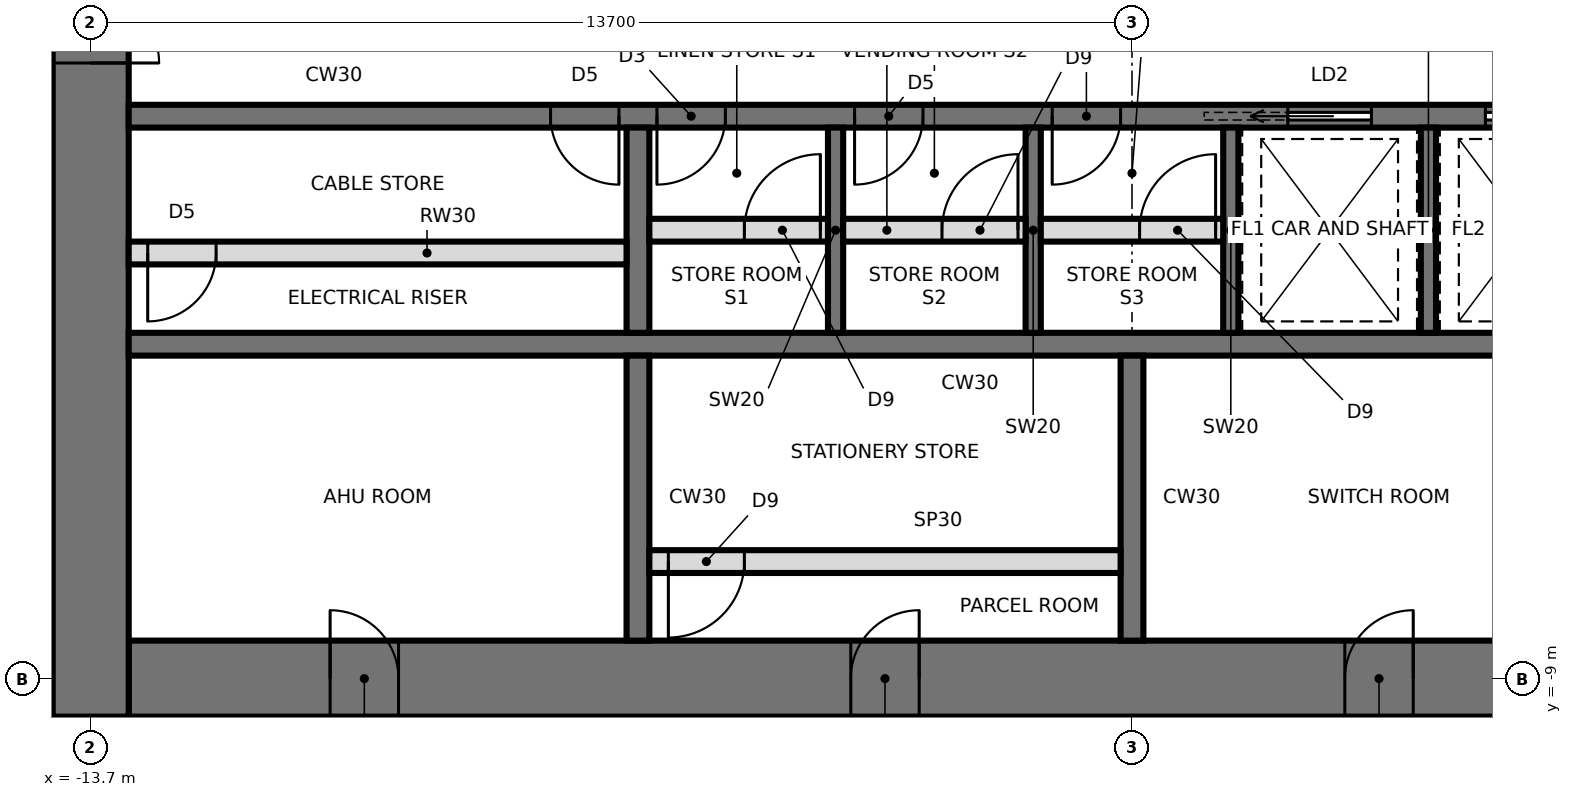
"""IFC4 building model, lengths in metres.
Left out: names, types, materials, properties, quantities, classifications, styles, units other than length and angle.
Written with IfcOpenShell. Run it as: python <this file> out.ifc"""

import sys

from ifc_helpers import new_model, si_unit, direction, frame, frame_2d, origin, place, context, subcontext, project, spatial, rectangle, extrude, element, fill, save


model = new_model("IFC4")
c1 = context("Model", 3, precision=1e-05, world=origin(), true_north=direction((0.0, 1.0)))
c2 = subcontext(c1, "Body", "Model", "MODEL_VIEW")
j1 = project(units=[si_unit("LENGTHUNIT", "METRE"), si_unit("PLANEANGLEUNIT", "RADIAN")], contexts=[c1])
p1 = place(None, origin())
s1 = spatial("IfcSite", under=j1, at=p1, CompositionType="ELEMENT")
p2 = place(p1, origin())
s2 = spatial("IfcBuilding", under=s1, at=p2, CompositionType="ELEMENT")
p3 = place(p2, frame((0.0, 0.0, 264.4)))
s3 = spatial("IfcBuildingStorey", under=s2, at=p3, CompositionType="ELEMENT", Elevation=264.4)
p4 = place(p3, frame((-13.2, -9.0, 0.0), z_axis=(0.0, 0.0, 1.0), x_axis=(1.0, 0.0, 0.0)))
e1 = element("IfcWall", 1, at=p4, inside=s3, PredefinedType="SHEAR", context=c2, shape_type="SweptSolid", body=[
    extrude(rectangle(XDim=26.4, YDim=1.0, at=frame_2d((13.2, 0.0))), origin(), (0.0, 0.0, 1.0), 4.2),
])
p5 = place(p4, frame((2.65, 0.0, 0.0)))
e2 = element("IfcOpeningElement", 2, at=p5, cuts=e1, PredefinedType="OPENING", context=c2, shape_type="SweptSolid", body=[
    extrude(rectangle(XDim=0.9, YDim=2.1, at=frame_2d((0.45, 1.05))), frame((0.0, 0.51, 0.0), z_axis=(0.0, -1.0, 0.0), x_axis=(1.0, 0.0, 0.0)), (0.0, 0.0, 1.0), 1.02),
])
p6 = place(p4, frame((9.5, 0.0, 0.0)))
e3 = element("IfcOpeningElement", 3, at=p6, cuts=e1, PredefinedType="OPENING", context=c2, shape_type="SweptSolid", body=[
    extrude(rectangle(XDim=0.9, YDim=2.1, at=frame_2d((0.45, 1.05))), frame((0.0, 0.51, 0.0), z_axis=(0.0, -1.0, 0.0), x_axis=(1.0, 0.0, 0.0)), (0.0, 0.0, 1.0), 1.02),
])
p7 = place(p4, frame((16.0, 0.0, 0.0)))
e4 = element("IfcOpeningElement", 4, at=p7, cuts=e1, PredefinedType="OPENING", context=c2, shape_type="SweptSolid", body=[
    extrude(rectangle(XDim=0.9, YDim=2.1, at=frame_2d((0.45, 1.05))), frame((0.0, 0.51, 0.0), z_axis=(0.0, -1.0, 0.0), x_axis=(1.0, 0.0, 0.0)), (0.0, 0.0, 1.0), 1.02),
])
p8 = place(p4, frame((22.85, 0.0, 0.0)))
e5 = element("IfcOpeningElement", 5, at=p8, cuts=e1, PredefinedType="OPENING", context=c2, shape_type="SweptSolid", body=[
    extrude(rectangle(XDim=0.9, YDim=2.1, at=frame_2d((0.45, 1.05))), frame((0.0, 0.51, 0.0), z_axis=(0.0, -1.0, 0.0), x_axis=(1.0, 0.0, 0.0)), (0.0, 0.0, 1.0), 1.02),
])
p9 = place(p3, frame((-13.7, 9.5, 0.0), z_axis=(0.0, 0.0, 1.0), x_axis=(0.0, -1.0, 0.0)))
e6 = element("IfcWall", 6, at=p9, inside=s3, PredefinedType="SHEAR", context=c2, shape_type="SweptSolid", body=[
    extrude(rectangle(XDim=19.0, YDim=1.0, at=frame_2d((9.5, 0.0))), origin(), (0.0, 0.0, 1.0), 4.2),
])
p10 = place(p9, frame((8.6, 0.0, 0.0)))
e7 = element("IfcOpeningElement", 7, at=p10, cuts=e6, PredefinedType="OPENING", context=c2, shape_type="SweptSolid", body=[
    extrude(rectangle(XDim=1.8, YDim=2.4, at=frame_2d((0.9, 1.2))), frame((0.0, 0.51, 0.0), z_axis=(0.0, -1.0, 0.0), x_axis=(1.0, 0.0, 0.0)), (0.0, 0.0, 1.0), 1.02),
])
p11 = place(p3, frame((-13.2, -1.6, 0.0), z_axis=(0.0, 0.0, 1.0), x_axis=(1.0, 0.0, 0.0)))
e8 = element("IfcWall", 8, at=p11, inside=s3, PredefinedType="SHEAR", context=c2, shape_type="SweptSolid", body=[
    extrude(rectangle(XDim=26.4, YDim=0.3, at=frame_2d((13.2, 0.0))), origin(), (0.0, 0.0, 1.0), 4.2),
])
p12 = place(p11, frame((25.15, 0.0, 0.0)))
e9 = element("IfcOpeningElement", 9, at=p12, cuts=e8, PredefinedType="OPENING", context=c2, shape_type="SweptSolid", body=[
    extrude(rectangle(XDim=1.0, YDim=2.1, at=frame_2d((0.5, 1.05))), frame((0.0, 0.16, 0.0), z_axis=(0.0, -1.0, 0.0), x_axis=(1.0, 0.0, 0.0)), (0.0, 0.0, 1.0), 0.32),
])
p13 = place(p11, frame((6.95, 0.0, 0.0)))
e10 = element("IfcOpeningElement", 10, at=p13, cuts=e8, PredefinedType="OPENING", context=c2, shape_type="SweptSolid", body=[
    extrude(rectangle(XDim=0.9, YDim=2.1, at=frame_2d((0.45, 1.05))), frame((0.0, 0.16, 0.0), z_axis=(0.0, -1.0, 0.0), x_axis=(1.0, 0.0, 0.0)), (0.0, 0.0, 1.0), 0.32),
])
p14 = place(p11, frame((9.55, 0.0, 0.0)))
e11 = element("IfcOpeningElement", 11, at=p14, cuts=e8, PredefinedType="OPENING", context=c2, shape_type="SweptSolid", body=[
    extrude(rectangle(XDim=0.9, YDim=2.1, at=frame_2d((0.45, 1.05))), frame((0.0, 0.16, 0.0), z_axis=(0.0, -1.0, 0.0), x_axis=(1.0, 0.0, 0.0)), (0.0, 0.0, 1.0), 0.32),
])
p15 = place(p11, frame((12.15, 0.0, 0.0)))
e12 = element("IfcOpeningElement", 12, at=p15, cuts=e8, PredefinedType="OPENING", context=c2, shape_type="SweptSolid", body=[
    extrude(rectangle(XDim=0.9, YDim=2.1, at=frame_2d((0.45, 1.05))), frame((0.0, 0.16, 0.0), z_axis=(0.0, -1.0, 0.0), x_axis=(1.0, 0.0, 0.0)), (0.0, 0.0, 1.0), 0.32),
])
p16 = place(p11, frame((15.25, 0.0, 0.0)))
e13 = element("IfcOpeningElement", 13, at=p16, cuts=e8, PredefinedType="OPENING", context=c2, shape_type="SweptSolid", body=[
    extrude(rectangle(XDim=1.1, YDim=2.3, at=frame_2d((0.55, 1.15))), frame((0.0, 0.16, 0.0), z_axis=(0.0, -1.0, 0.0), x_axis=(1.0, 0.0, 0.0)), (0.0, 0.0, 1.0), 0.32),
])
p17 = place(p11, frame((17.85, 0.0, 0.0)))
e14 = element("IfcOpeningElement", 14, at=p17, cuts=e8, PredefinedType="OPENING", context=c2, shape_type="SweptSolid", body=[
    extrude(rectangle(XDim=1.1, YDim=2.3, at=frame_2d((0.55, 1.15))), frame((0.0, 0.16, 0.0), z_axis=(0.0, -1.0, 0.0), x_axis=(1.0, 0.0, 0.0)), (0.0, 0.0, 1.0), 0.32),
])
p18 = place(p11, frame((5.55, 0.0, 0.0)))
e15 = element("IfcOpeningElement", 15, at=p18, cuts=e8, PredefinedType="OPENING", context=c2, shape_type="SweptSolid", body=[
    extrude(rectangle(XDim=0.9, YDim=2.1, at=frame_2d((0.45, 1.05))), frame((0.0, 0.16, 0.0), z_axis=(0.0, -1.0, 0.0), x_axis=(1.0, 0.0, 0.0)), (0.0, 0.0, 1.0), 0.32),
])
p19 = place(p3, frame((-13.2, -4.6, 0.0), z_axis=(0.0, 0.0, 1.0), x_axis=(1.0, 0.0, 0.0)))
e16 = element("IfcWall", 16, at=p19, inside=s3, PredefinedType="SHEAR", context=c2, shape_type="SweptSolid", body=[
    extrude(rectangle(XDim=26.4, YDim=0.3, at=frame_2d((13.2, 0.0))), origin(), (0.0, 0.0, 1.0), 4.2),
])
p20 = place(p3, frame((-6.5, -1.75, 0.0), z_axis=(0.0, 0.0, 1.0), x_axis=(0.0, -1.0, 0.0)))
e17 = element("IfcWall", 17, at=p20, inside=s3, PredefinedType="SHEAR", context=c2, shape_type="SweptSolid", body=[
    extrude(rectangle(XDim=2.7, YDim=0.3, at=frame_2d((1.35, 0.0))), origin(), (0.0, 0.0, 1.0), 4.2),
])
p21 = place(p3, frame((-6.5, -4.75, 0.0), z_axis=(0.0, 0.0, 1.0), x_axis=(0.0, -1.0, 0.0)))
e18 = element("IfcWall", 18, at=p21, inside=s3, PredefinedType="SHEAR", context=c2, shape_type="SweptSolid", body=[
    extrude(rectangle(XDim=3.75, YDim=0.3, at=frame_2d((1.875, 0.0))), origin(), (0.0, 0.0, 1.0), 4.2),
])
for number, where, z_axis, x_axis in (
    (19, (-3.9, -1.75, 0.0), (0.0, 0.0, 1.0), (0.0, -1.0, 0.0)),
    (20, (-1.3, -1.75, 0.0), (0.0, 0.0, 1.0), (0.0, -1.0, 0.0)),
    (21, (1.3, -1.75, 0.0), (0.0, 0.0, 1.0), (0.0, -1.0, 0.0)),
    (22, (3.9, -1.75, 0.0), (0.0, 0.0, 1.0), (0.0, -1.0, 0.0)),
):
    element("IfcWall", number, at=place(p3, frame(where, z_axis=z_axis, x_axis=x_axis)), inside=s3, PredefinedType="SHEAR", context=c2, shape_type="SweptSolid", body=[
        extrude(rectangle(XDim=2.7, YDim=0.2, at=frame_2d((1.35, 0.0))), origin(), (0.0, 0.0, 1.0), 4.2),
    ])
p22 = place(p3, frame((0.0, -4.75, 0.0), z_axis=(0.0, 0.0, 1.0), x_axis=(0.0, -1.0, 0.0)))
e23 = element("IfcWall", 23, at=p22, inside=s3, PredefinedType="SHEAR", context=c2, shape_type="SweptSolid", body=[
    extrude(rectangle(XDim=3.75, YDim=0.3, at=frame_2d((1.875, 0.0))), origin(), (0.0, 0.0, 1.0), 4.2),
])
p23 = place(p3, frame((-6.35, -3.1, 0.0), z_axis=(0.0, 0.0, 1.0), x_axis=(1.0, 0.0, 0.0)))
e24 = element("IfcWall", 24, at=p23, inside=s3, PredefinedType="PARTITIONING", context=c2, shape_type="SweptSolid", body=[
    extrude(rectangle(XDim=2.35, YDim=0.3, at=frame_2d((1.175, 0.0))), origin(), (0.0, 0.0, 1.0), 4.04),
])
p24 = place(p23, frame((1.25, 0.0, 0.0)))
e25 = element("IfcOpeningElement", 25, at=p24, cuts=e24, PredefinedType="OPENING", context=c2, shape_type="SweptSolid", body=[
    extrude(rectangle(XDim=1.0, YDim=2.4, at=frame_2d((0.5, 1.2))), frame((0.0, 0.16, 0.0), z_axis=(0.0, -1.0, 0.0), x_axis=(1.0, 0.0, 0.0)), (0.0, 0.0, 1.0), 0.32),
])
p25 = place(p3, frame((-3.8, -3.1, 0.0), z_axis=(0.0, 0.0, 1.0), x_axis=(1.0, 0.0, 0.0)))
e26 = element("IfcWall", 26, at=p25, inside=s3, PredefinedType="PARTITIONING", context=c2, shape_type="SweptSolid", body=[
    extrude(rectangle(XDim=2.4, YDim=0.3, at=frame_2d((1.2, 0.0))), origin(), (0.0, 0.0, 1.0), 4.04),
])
p26 = place(p25, frame((1.3, 0.0, 0.0)))
e27 = element("IfcOpeningElement", 27, at=p26, cuts=e26, PredefinedType="OPENING", context=c2, shape_type="SweptSolid", body=[
    extrude(rectangle(XDim=1.0, YDim=2.4, at=frame_2d((0.5, 1.2))), frame((0.0, 0.16, 0.0), z_axis=(0.0, -1.0, 0.0), x_axis=(1.0, 0.0, 0.0)), (0.0, 0.0, 1.0), 0.32),
])
p27 = place(p3, frame((-1.2, -3.1, 0.0), z_axis=(0.0, 0.0, 1.0), x_axis=(1.0, 0.0, 0.0)))
e28 = element("IfcWall", 28, at=p27, inside=s3, PredefinedType="PARTITIONING", context=c2, shape_type="SweptSolid", body=[
    extrude(rectangle(XDim=2.4, YDim=0.3, at=frame_2d((1.2, 0.0))), origin(), (0.0, 0.0, 1.0), 4.04),
])
p28 = place(p27, frame((1.3, 0.0, 0.0)))
e29 = element("IfcOpeningElement", 29, at=p28, cuts=e28, PredefinedType="OPENING", context=c2, shape_type="SweptSolid", body=[
    extrude(rectangle(XDim=1.0, YDim=2.4, at=frame_2d((0.5, 1.2))), frame((0.0, 0.16, 0.0), z_axis=(0.0, -1.0, 0.0), x_axis=(1.0, 0.0, 0.0)), (0.0, 0.0, 1.0), 0.32),
])
p29 = place(p3, frame((-6.35, -7.46, 0.0), z_axis=(0.0, 0.0, 1.0), x_axis=(1.0, 0.0, 0.0)))
e30 = element("IfcWall", 30, at=p29, inside=s3, PredefinedType="PARTITIONING", context=c2, shape_type="SweptSolid", body=[
    extrude(rectangle(XDim=6.2, YDim=0.3, at=frame_2d((3.1, 0.0))), origin(), (0.0, 0.0, 1.0), 4.04),
])
p30 = place(p29, frame((0.25, 0.0, 0.0)))
e31 = element("IfcOpeningElement", 31, at=p30, cuts=e30, PredefinedType="OPENING", context=c2, shape_type="SweptSolid", body=[
    extrude(rectangle(XDim=1.0, YDim=2.4, at=frame_2d((0.5, 1.2))), frame((0.0, 0.16, 0.0), z_axis=(0.0, -1.0, 0.0), x_axis=(1.0, 0.0, 0.0)), (0.0, 0.0, 1.0), 0.32),
])
p31 = place(p3, frame((-13.2, -3.4, 0.0), z_axis=(0.0, 0.0, 1.0), x_axis=(1.0, 0.0, 0.0)))
e32 = element("IfcWall", 32, at=p31, inside=s3, PredefinedType="SOLIDWALL", context=c2, shape_type="SweptSolid", body=[
    extrude(rectangle(XDim=6.55, YDim=0.3, at=frame_2d((3.275, 0.0))), origin(), (0.0, 0.0, 1.0), 4.04),
])
p32 = place(p31, frame((0.25, 0.0, 0.0)))
e33 = element("IfcOpeningElement", 33, at=p32, cuts=e32, PredefinedType="OPENING", context=c2, shape_type="SweptSolid", body=[
    extrude(rectangle(XDim=0.9, YDim=2.1, at=frame_2d((0.45, 1.05))), frame((0.0, 0.16, 0.0), z_axis=(0.0, -1.0, 0.0), x_axis=(1.0, 0.0, 0.0)), (0.0, 0.0, 1.0), 0.32),
])
p33 = place(p10, origin())
e34 = element("IfcDoor", 34, at=p33, inside=s3, OperationType="DOUBLE_DOOR_SINGLE_SWING", PredefinedType="DOOR", context=c2, shape_type="SweptSolid", body=[
    extrude(rectangle(XDim=1.72, YDim=2.36, at=frame_2d((0.9, 1.18))), frame((0.0, 0.025, 0.0), z_axis=(0.0, -1.0, 0.0), x_axis=(1.0, 0.0, 0.0)), (0.0, 0.0, 1.0), 0.05),
    extrude(rectangle(XDim=0.04, YDim=2.4, at=frame_2d((0.02, 1.2))), frame((0.0, 0.25, 0.0), z_axis=(0.0, -1.0, 0.0), x_axis=(1.0, 0.0, 0.0)), (0.0, 0.0, 1.0), 0.5),
    extrude(rectangle(XDim=0.04, YDim=2.4, at=frame_2d((1.78, 1.2))), frame((0.0, 0.25, 0.0), z_axis=(0.0, -1.0, 0.0), x_axis=(1.0, 0.0, 0.0)), (0.0, 0.0, 1.0), 0.5),
    extrude(rectangle(XDim=1.72, YDim=0.04, at=frame_2d((0.9, 2.38))), frame((0.0, 0.25, 0.0), z_axis=(0.0, -1.0, 0.0), x_axis=(1.0, 0.0, 0.0)), (0.0, 0.0, 1.0), 0.5),
])
fill(e7, e34)
p34 = place(p24, origin())
e35 = element("IfcDoor", 35, at=p34, inside=s3, OperationType="SINGLE_SWING_RIGHT", PredefinedType="DOOR", context=c2, shape_type="SweptSolid", body=[
    extrude(rectangle(XDim=1.0, YDim=2.4, at=frame_2d((0.5, 1.2))), frame((0.0, 0.025, 0.0), z_axis=(0.0, -1.0, 0.0), x_axis=(1.0, 0.0, 0.0)), (0.0, 0.0, 1.0), 0.05),
])
fill(e25, e35)
p35 = place(p13, frame((0.9, 0.0, 0.0), z_axis=(0.0, 0.0, 1.0), x_axis=(-1.0, 0.0, 0.0)))
e36 = element("IfcDoor", 36, at=p35, inside=s3, OperationType="SINGLE_SWING_RIGHT", PredefinedType="DOOR", context=c2, shape_type="SweptSolid", body=[
    extrude(rectangle(XDim=0.9, YDim=2.1, at=frame_2d((0.45, 1.05))), frame((0.0, 0.025, 0.0), z_axis=(0.0, -1.0, 0.0), x_axis=(1.0, 0.0, 0.0)), (0.0, 0.0, 1.0), 0.05),
])
fill(e10, e36)
p36 = place(p26, origin())
e37 = element("IfcDoor", 37, at=p36, inside=s3, OperationType="SINGLE_SWING_RIGHT", PredefinedType="DOOR", context=c2, shape_type="SweptSolid", body=[
    extrude(rectangle(XDim=1.0, YDim=2.4, at=frame_2d((0.5, 1.2))), frame((0.0, 0.025, 0.0), z_axis=(0.0, -1.0, 0.0), x_axis=(1.0, 0.0, 0.0)), (0.0, 0.0, 1.0), 0.05),
])
fill(e27, e37)
p37 = place(p14, frame((0.9, 0.0, 0.0), z_axis=(0.0, 0.0, 1.0), x_axis=(-1.0, 0.0, 0.0)))
e38 = element("IfcDoor", 38, at=p37, inside=s3, OperationType="SINGLE_SWING_RIGHT", PredefinedType="DOOR", context=c2, shape_type="SweptSolid", body=[
    extrude(rectangle(XDim=0.9, YDim=2.1, at=frame_2d((0.45, 1.05))), frame((0.0, 0.025, 0.0), z_axis=(0.0, -1.0, 0.0), x_axis=(1.0, 0.0, 0.0)), (0.0, 0.0, 1.0), 0.05),
])
fill(e11, e38)
p38 = place(p28, origin())
e39 = element("IfcDoor", 39, at=p38, inside=s3, OperationType="SINGLE_SWING_RIGHT", PredefinedType="DOOR", context=c2, shape_type="SweptSolid", body=[
    extrude(rectangle(XDim=1.0, YDim=2.4, at=frame_2d((0.5, 1.2))), frame((0.0, 0.025, 0.0), z_axis=(0.0, -1.0, 0.0), x_axis=(1.0, 0.0, 0.0)), (0.0, 0.0, 1.0), 0.05),
])
fill(e29, e39)
p39 = place(p15, frame((0.9, 0.0, 0.0), z_axis=(0.0, 0.0, 1.0), x_axis=(-1.0, 0.0, 0.0)))
e40 = element("IfcDoor", 40, at=p39, inside=s3, OperationType="SINGLE_SWING_RIGHT", PredefinedType="DOOR", context=c2, shape_type="SweptSolid", body=[
    extrude(rectangle(XDim=0.9, YDim=2.1, at=frame_2d((0.45, 1.05))), frame((0.0, 0.025, 0.0), z_axis=(0.0, -1.0, 0.0), x_axis=(1.0, 0.0, 0.0)), (0.0, 0.0, 1.0), 0.05),
])
fill(e12, e40)
p40 = place(p16, frame((1.1, 0.0, 0.0), z_axis=(0.0, 0.0, 1.0), x_axis=(-1.0, 0.0, 0.0)))
e41 = element("IfcDoor", 41, at=p40, inside=s3, OperationType="SLIDING_TO_RIGHT", PredefinedType="DOOR", context=c2, shape_type="SweptSolid", body=[
    extrude(rectangle(XDim=1.1, YDim=2.3, at=frame_2d((0.55, 1.15))), frame((0.0, 0.025, 0.0), z_axis=(0.0, -1.0, 0.0), x_axis=(1.0, 0.0, 0.0)), (0.0, 0.0, 1.0), 0.05),
])
fill(e13, e41)
p41 = place(p17, frame((1.1, 0.0, 0.0), z_axis=(0.0, 0.0, 1.0), x_axis=(-1.0, 0.0, 0.0)))
e42 = element("IfcDoor", 42, at=p41, inside=s3, OperationType="SLIDING_TO_LEFT", PredefinedType="DOOR", context=c2, shape_type="SweptSolid", body=[
    extrude(rectangle(XDim=1.1, YDim=2.3, at=frame_2d((0.55, 1.15))), frame((0.0, 0.025, 0.0), z_axis=(0.0, -1.0, 0.0), x_axis=(1.0, 0.0, 0.0)), (0.0, 0.0, 1.0), 0.05),
])
fill(e14, e42)
p42 = place(p18, frame((0.9, 0.0, 0.0), z_axis=(0.0, 0.0, 1.0), x_axis=(-1.0, 0.0, 0.0)))
e43 = element("IfcDoor", 43, at=p42, inside=s3, OperationType="SINGLE_SWING_LEFT", PredefinedType="DOOR", context=c2, shape_type="SweptSolid", body=[
    extrude(rectangle(XDim=0.9, YDim=2.1, at=frame_2d((0.45, 1.05))), frame((0.0, 0.025, 0.0), z_axis=(0.0, -1.0, 0.0), x_axis=(1.0, 0.0, 0.0)), (0.0, 0.0, 1.0), 0.05),
])
fill(e15, e43)
p43 = place(p5, origin())
e44 = element("IfcDoor", 44, at=p43, inside=s3, OperationType="SINGLE_SWING_LEFT", PredefinedType="DOOR", context=c2, shape_type="SweptSolid", body=[
    extrude(rectangle(XDim=0.82, YDim=2.06, at=frame_2d((0.45, 1.03))), frame((0.0, 0.025, 0.0), z_axis=(0.0, -1.0, 0.0), x_axis=(1.0, 0.0, 0.0)), (0.0, 0.0, 1.0), 0.05),
    extrude(rectangle(XDim=0.04, YDim=2.1, at=frame_2d((0.02, 1.05))), frame((0.0, 0.25, 0.0), z_axis=(0.0, -1.0, 0.0), x_axis=(1.0, 0.0, 0.0)), (0.0, 0.0, 1.0), 0.5),
    extrude(rectangle(XDim=0.04, YDim=2.1, at=frame_2d((0.88, 1.05))), frame((0.0, 0.25, 0.0), z_axis=(0.0, -1.0, 0.0), x_axis=(1.0, 0.0, 0.0)), (0.0, 0.0, 1.0), 0.5),
    extrude(rectangle(XDim=0.82, YDim=0.04, at=frame_2d((0.45, 2.08))), frame((0.0, 0.25, 0.0), z_axis=(0.0, -1.0, 0.0), x_axis=(1.0, 0.0, 0.0)), (0.0, 0.0, 1.0), 0.5),
])
fill(e2, e44)
p44 = place(p6, origin())
e45 = element("IfcDoor", 45, at=p44, inside=s3, OperationType="SINGLE_SWING_RIGHT", PredefinedType="DOOR", context=c2, shape_type="SweptSolid", body=[
    extrude(rectangle(XDim=0.82, YDim=2.06, at=frame_2d((0.45, 1.03))), frame((0.0, 0.025, 0.0), z_axis=(0.0, -1.0, 0.0), x_axis=(1.0, 0.0, 0.0)), (0.0, 0.0, 1.0), 0.05),
    extrude(rectangle(XDim=0.04, YDim=2.1, at=frame_2d((0.02, 1.05))), frame((0.0, 0.25, 0.0), z_axis=(0.0, -1.0, 0.0), x_axis=(1.0, 0.0, 0.0)), (0.0, 0.0, 1.0), 0.5),
    extrude(rectangle(XDim=0.04, YDim=2.1, at=frame_2d((0.88, 1.05))), frame((0.0, 0.25, 0.0), z_axis=(0.0, -1.0, 0.0), x_axis=(1.0, 0.0, 0.0)), (0.0, 0.0, 1.0), 0.5),
    extrude(rectangle(XDim=0.82, YDim=0.04, at=frame_2d((0.45, 2.08))), frame((0.0, 0.25, 0.0), z_axis=(0.0, -1.0, 0.0), x_axis=(1.0, 0.0, 0.0)), (0.0, 0.0, 1.0), 0.5),
])
fill(e3, e45)
p45 = place(p7, origin())
e46 = element("IfcDoor", 46, at=p45, inside=s3, OperationType="SINGLE_SWING_RIGHT", PredefinedType="DOOR", context=c2, shape_type="SweptSolid", body=[
    extrude(rectangle(XDim=0.82, YDim=2.06, at=frame_2d((0.45, 1.03))), frame((0.0, 0.025, 0.0), z_axis=(0.0, -1.0, 0.0), x_axis=(1.0, 0.0, 0.0)), (0.0, 0.0, 1.0), 0.05),
    extrude(rectangle(XDim=0.04, YDim=2.1, at=frame_2d((0.02, 1.05))), frame((0.0, 0.25, 0.0), z_axis=(0.0, -1.0, 0.0), x_axis=(1.0, 0.0, 0.0)), (0.0, 0.0, 1.0), 0.5),
    extrude(rectangle(XDim=0.04, YDim=2.1, at=frame_2d((0.88, 1.05))), frame((0.0, 0.25, 0.0), z_axis=(0.0, -1.0, 0.0), x_axis=(1.0, 0.0, 0.0)), (0.0, 0.0, 1.0), 0.5),
    extrude(rectangle(XDim=0.82, YDim=0.04, at=frame_2d((0.45, 2.08))), frame((0.0, 0.25, 0.0), z_axis=(0.0, -1.0, 0.0), x_axis=(1.0, 0.0, 0.0)), (0.0, 0.0, 1.0), 0.5),
])
fill(e4, e46)
p46 = place(p30, frame((1.0, 0.0, 0.0), z_axis=(0.0, 0.0, 1.0), x_axis=(-1.0, 0.0, 0.0)))
e47 = element("IfcDoor", 47, at=p46, inside=s3, OperationType="SINGLE_SWING_RIGHT", PredefinedType="DOOR", context=c2, shape_type="SweptSolid", body=[
    extrude(rectangle(XDim=1.0, YDim=2.4, at=frame_2d((0.5, 1.2))), frame((0.0, 0.025, 0.0), z_axis=(0.0, -1.0, 0.0), x_axis=(1.0, 0.0, 0.0)), (0.0, 0.0, 1.0), 0.05),
])
fill(e31, e47)
p47 = place(p32, frame((0.9, 0.0, 0.0), z_axis=(0.0, 0.0, 1.0), x_axis=(-1.0, 0.0, 0.0)))
e48 = element("IfcDoor", 48, at=p47, inside=s3, OperationType="SINGLE_SWING_RIGHT", PredefinedType="DOOR", context=c2, shape_type="SweptSolid", body=[
    extrude(rectangle(XDim=0.9, YDim=2.1, at=frame_2d((0.45, 1.05))), frame((0.0, 0.025, 0.0), z_axis=(0.0, -1.0, 0.0), x_axis=(1.0, 0.0, 0.0)), (0.0, 0.0, 1.0), 0.05),
])
fill(e33, e48)
save(model, sys.argv[1])
